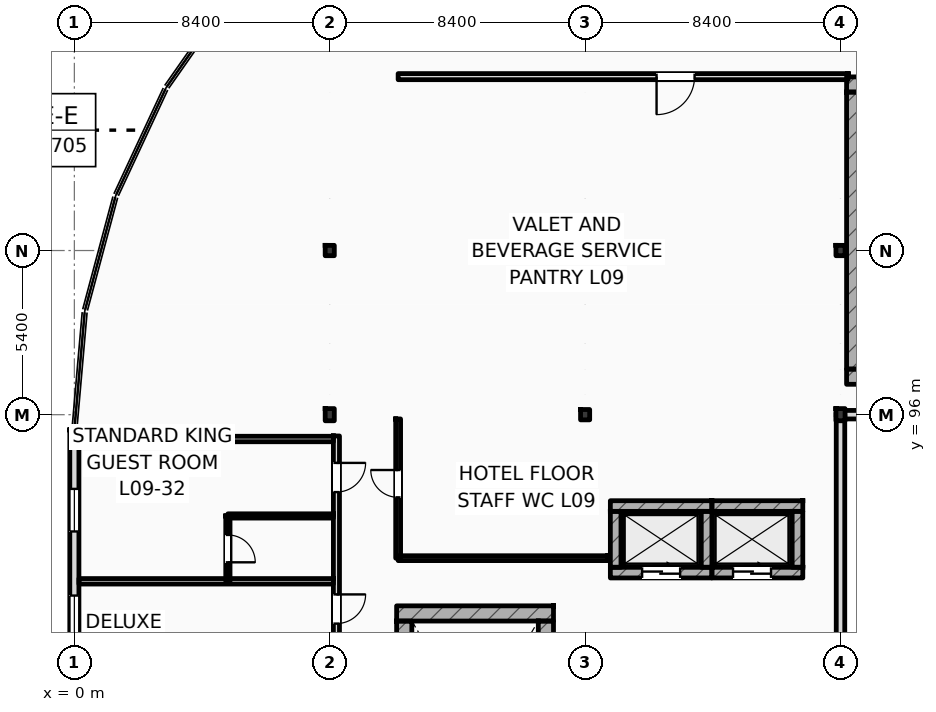
"""IFC4 building model, lengths in metres.
Left out: names, types, materials, properties, quantities, classifications, styles, units other than length and angle.
Written with IfcOpenShell. Run it as: python <this file> out.ifc"""

import sys

from ifc_helpers import new_model, si_unit, direction, frame, frame_2d, origin, origin_2d, place, context, subcontext, project, spatial, rectangle, i_section, extrude, element, fill, save


model = new_model("IFC4")
c1 = context("Model", 3, precision=1e-05, world=origin(), true_north=direction((0.0, 1.0)))
c2 = subcontext(c1, "Body", "Model", "MODEL_VIEW")
j1 = project(units=[si_unit("LENGTHUNIT", "METRE"), si_unit("PLANEANGLEUNIT", "RADIAN")], contexts=[c1])
p1 = place(None, origin())
s1 = spatial("IfcSite", under=j1, at=p1, CompositionType="ELEMENT")
p2 = place(p1, origin())
s2 = spatial("IfcBuilding", under=s1, at=p2, CompositionType="ELEMENT")
p3 = place(p2, frame((0.0, 0.0, 39.0)))
s3 = spatial("IfcBuildingStorey", under=s2, at=p3, CompositionType="ELEMENT", Elevation=39.0)
p4 = place(p3, frame((8.4, 96.0, 0.0), z_axis=(0.0, 0.0, 1.0), x_axis=(1.0, 0.0, 0.0)))
e1 = element("IfcColumn", 1, at=p4, inside=s3, PredefinedType="COLUMN", context=c2, shape_type="SweptSolid", body=[
    extrude(i_section(OverallWidth=0.3, OverallDepth=0.4, WebThickness=0.013, FlangeThickness=0.024, FilletRadius=0.027, at=origin_2d()), origin(), (0.0, 0.0, 1.0), 3.6),
])
p5 = place(p3, frame((16.8, 96.0, 0.0), z_axis=(0.0, 0.0, 1.0), x_axis=(1.0, 0.0, 0.0)))
e2 = element("IfcColumn", 2, at=p5, inside=s3, PredefinedType="COLUMN", context=c2, shape_type="SweptSolid", body=[
    extrude(i_section(OverallWidth=0.3, OverallDepth=0.34, WebThickness=0.012, FlangeThickness=0.021, FilletRadius=0.027, at=origin_2d()), origin(), (0.0, 0.0, 1.0), 3.6),
])
p6 = place(p3, frame((25.2, 96.0, 0.0), z_axis=(0.0, 0.0, 1.0), x_axis=(1.0, 0.0, 0.0)))
e3 = element("IfcColumn", 3, at=p6, inside=s3, PredefinedType="COLUMN", context=c2, shape_type="SweptSolid", body=[
    extrude(i_section(OverallWidth=0.3, OverallDepth=0.4, WebThickness=0.013, FlangeThickness=0.024, FilletRadius=0.027, at=origin_2d()), origin(), (0.0, 0.0, 1.0), 3.6),
])
for number, where, z_axis, x_axis in (
    (4, (8.4, 101.4, 0.0), (0.0, 0.0, 1.0), (1.0, 0.0, 0.0)),
    (5, (16.8, 101.4, 0.0), (0.0, 0.0, 1.0), (1.0, 0.0, 0.0)),
    (6, (25.2, 101.4, 0.0), (0.0, 0.0, 1.0), (1.0, 0.0, 0.0)),
):
    element("IfcColumn", number, at=place(p3, frame(where, z_axis=z_axis, x_axis=x_axis)), inside=s3, PredefinedType="COLUMN", context=c2, shape_type="SweptSolid", body=[
        extrude(i_section(OverallWidth=0.3, OverallDepth=0.34, WebThickness=0.012, FlangeThickness=0.021, FilletRadius=0.027, at=origin_2d()), origin(), (0.0, 0.0, 1.0), 3.6),
    ])
p7 = place(p3, frame((10.6, 89.462, 0.0), z_axis=(0.0, 0.0, 1.0), x_axis=(1.0, 0.0, 0.0)))
e7 = element("IfcWall", 7, at=p7, inside=s3, PredefinedType="SHEAR", context=c2, shape_type="SweptSolid", body=[
    extrude(rectangle(XDim=5.16, YDim=0.5, at=frame_2d((2.58, 0.0))), origin(), (0.0, 0.0, 1.0), 3.6),
])
p8 = place(p3, frame((10.85, 80.1, 0.0), z_axis=(0.0, 0.0, 1.0), x_axis=(0.0, 1.0, 0.0)))
e8 = element("IfcWall", 8, at=p8, inside=s3, PredefinedType="SHEAR", context=c2, shape_type="SweptSolid", body=[
    extrude(rectangle(XDim=9.112, YDim=0.5, at=frame_2d((4.556, 0.0))), origin(), (0.0, 0.0, 1.0), 3.6),
])
p9 = place(p3, frame((15.51, 80.1, 0.0), z_axis=(0.0, 0.0, 1.0), x_axis=(0.0, 1.0, 0.0)))
e9 = element("IfcWall", 9, at=p9, inside=s3, PredefinedType="SHEAR", context=c2, shape_type="SweptSolid", body=[
    extrude(rectangle(XDim=9.112, YDim=0.5, at=frame_2d((4.556, 0.0))), origin(), (0.0, 0.0, 1.0), 3.6),
])
p10 = place(p9, frame((0.44, 0.0, 0.0)))
e10 = element("IfcOpeningElement", 10, at=p10, cuts=e9, PredefinedType="OPENING", context=c2, shape_type="SweptSolid", body=[
    extrude(rectangle(XDim=1.1, YDim=2.2, at=frame_2d((0.55, 1.1))), frame((0.0, 0.26, 0.0), z_axis=(0.0, -1.0, 0.0), x_axis=(1.0, 0.0, 0.0)), (0.0, 0.0, 1.0), 0.52),
])
for number, where, z_axis, x_axis in (
    (11, (25.4, 106.862, 0.0), (0.0, 0.0, 1.0), (1.0, 0.0, 0.0)),
    (12, (25.4, 97.25, 0.0), (0.0, 0.0, 1.0), (1.0, 0.0, 0.0)),
):
    element("IfcWall", number, at=place(p3, frame(where, z_axis=z_axis, x_axis=x_axis)), inside=s3, PredefinedType="SHEAR", context=c2, shape_type="SweptSolid", body=[
        extrude(rectangle(XDim=5.16, YDim=0.5, at=frame_2d((2.58, 0.0))), origin(), (0.0, 0.0, 1.0), 3.6),
    ])
p11 = place(p3, frame((25.65, 97.5, 0.0), z_axis=(0.0, 0.0, 1.0), x_axis=(0.0, 1.0, 0.0)))
e13 = element("IfcWall", 13, at=p11, inside=s3, PredefinedType="SHEAR", context=c2, shape_type="SweptSolid", body=[
    extrude(rectangle(XDim=9.112, YDim=0.5, at=frame_2d((4.556, 0.0))), origin(), (0.0, 0.0, 1.0), 3.6),
])
p12 = place(p3, frame((0.0, 88.0, 0.0), z_axis=(0.0, 0.0, 1.0), x_axis=(0.0, 1.0, 0.0)))
e14 = element("IfcWall", 14, at=p12, inside=s3, PredefinedType="STANDARD", context=c2, shape_type="SweptSolid", body=[
    extrude(rectangle(XDim=7.5, YDim=0.3, at=frame_2d((3.75, 0.0))), origin(), (0.0, 0.0, 1.0), 3.38),
])
p13 = place(p12, frame((0.8, 0.0, 0.9)))
e15 = element("IfcOpeningElement", 15, at=p13, cuts=e14, PredefinedType="OPENING", context=c2, shape_type="SweptSolid", body=[
    extrude(rectangle(XDim=1.25, YDim=1.6, at=frame_2d((0.625, 0.8))), frame((0.0, 0.16, 0.0), z_axis=(0.0, -1.0, 0.0), x_axis=(1.0, 0.0, 0.0)), (0.0, 0.0, 1.0), 0.32),
])
p14 = place(p12, frame((4.159, 0.0, 0.9)))
e16 = element("IfcOpeningElement", 16, at=p14, cuts=e14, PredefinedType="OPENING", context=c2, shape_type="SweptSolid", body=[
    extrude(rectangle(XDim=1.4, YDim=1.7, at=frame_2d((0.7, 0.85))), frame((0.0, 0.16, 0.0), z_axis=(0.0, -1.0, 0.0), x_axis=(1.0, 0.0, 0.0)), (0.0, 0.0, 1.0), 0.32),
])
p15 = place(p3, frame((25.2, 96.0, 0.0), z_axis=(0.0, 0.0, 1.0), x_axis=(1.0, 0.0, 0.0)))
e17 = element("IfcWall", 17, at=p15, inside=s3, PredefinedType="STANDARD", context=c2, shape_type="SweptSolid", body=[
    extrude(rectangle(XDim=70.2, YDim=0.28, at=frame_2d((35.1, 0.0))), origin(), (0.0, 0.0, 1.0), 2.92),
])
p16 = place(p15, frame((16.695, 0.0, 0.9)))
e18 = element("IfcOpeningElement", 18, at=p16, cuts=e17, PredefinedType="OPENING", context=c2, shape_type="SweptSolid", body=[
    extrude(rectangle(XDim=2.25, YDim=1.84, at=frame_2d((1.125, 0.92))), frame((0.0, 0.15, 0.0), z_axis=(0.0, -1.0, 0.0), x_axis=(1.0, 0.0, 0.0)), (0.0, 0.0, 1.0), 0.3),
])
p17 = place(p15, frame((20.748, 0.0, 0.9)))
e19 = element("IfcOpeningElement", 19, at=p17, cuts=e17, PredefinedType="OPENING", context=c2, shape_type="SweptSolid", body=[
    extrude(rectangle(XDim=1.8, YDim=1.84, at=frame_2d((0.9, 0.92))), frame((0.0, 0.15, 0.0), z_axis=(0.0, -1.0, 0.0), x_axis=(1.0, 0.0, 0.0)), (0.0, 0.0, 1.0), 0.3),
])
p18 = place(p15, frame((25.963, 0.0, 0.9)))
e20 = element("IfcOpeningElement", 20, at=p18, cuts=e17, PredefinedType="OPENING", context=c2, shape_type="SweptSolid", body=[
    extrude(rectangle(XDim=2.55, YDim=1.84, at=frame_2d((1.275, 0.92))), frame((0.0, 0.15, 0.0), z_axis=(0.0, -1.0, 0.0), x_axis=(1.0, 0.0, 0.0)), (0.0, 0.0, 1.0), 0.3),
])
p19 = place(p15, frame((32.177, 0.0, 0.9)))
e21 = element("IfcOpeningElement", 21, at=p19, cuts=e17, PredefinedType="OPENING", context=c2, shape_type="SweptSolid", body=[
    extrude(rectangle(XDim=1.35, YDim=1.84, at=frame_2d((0.675, 0.92))), frame((0.0, 0.15, 0.0), z_axis=(0.0, -1.0, 0.0), x_axis=(1.0, 0.0, 0.0)), (0.0, 0.0, 1.0), 0.3),
])
p20 = place(p15, frame((35.267, 0.0, 0.9)))
e22 = element("IfcOpeningElement", 22, at=p20, cuts=e17, PredefinedType="OPENING", context=c2, shape_type="SweptSolid", body=[
    extrude(rectangle(XDim=2.85, YDim=1.84, at=frame_2d((1.425, 0.92))), frame((0.0, 0.15, 0.0), z_axis=(0.0, -1.0, 0.0), x_axis=(1.0, 0.0, 0.0)), (0.0, 0.0, 1.0), 0.3),
])
p21 = place(p15, frame((55.56, 0.0, 0.9)))
e23 = element("IfcOpeningElement", 23, at=p21, cuts=e17, PredefinedType="OPENING", context=c2, shape_type="SweptSolid", body=[
    extrude(rectangle(XDim=1.8, YDim=1.84, at=frame_2d((0.9, 0.92))), frame((0.0, 0.15, 0.0), z_axis=(0.0, -1.0, 0.0), x_axis=(1.0, 0.0, 0.0)), (0.0, 0.0, 1.0), 0.3),
])
p22 = place(p15, frame((59.093, 0.0, 0.9)))
e24 = element("IfcOpeningElement", 24, at=p22, cuts=e17, PredefinedType="OPENING", context=c2, shape_type="SweptSolid", body=[
    extrude(rectangle(XDim=2.412, YDim=1.84, at=frame_2d((1.206, 0.92))), frame((0.0, 0.15, 0.0), z_axis=(0.0, -1.0, 0.0), x_axis=(1.0, 0.0, 0.0)), (0.0, 0.0, 1.0), 0.3),
])
p23 = place(p15, frame((63.325, 0.0, 0.9)))
e25 = element("IfcOpeningElement", 25, at=p23, cuts=e17, PredefinedType="OPENING", context=c2, shape_type="SweptSolid", body=[
    extrude(rectangle(XDim=1.8, YDim=1.84, at=frame_2d((0.9, 0.92))), frame((0.0, 0.15, 0.0), z_axis=(0.0, -1.0, 0.0), x_axis=(1.0, 0.0, 0.0)), (0.0, 0.0, 1.0), 0.3),
])
p24 = place(p15, frame((66.718, 0.0, 0.9)))
e26 = element("IfcOpeningElement", 26, at=p24, cuts=e17, PredefinedType="OPENING", context=c2, shape_type="SweptSolid", body=[
    extrude(rectangle(XDim=2.472, YDim=1.84, at=frame_2d((1.236, 0.92))), frame((0.0, 0.15, 0.0), z_axis=(0.0, -1.0, 0.0), x_axis=(1.0, 0.0, 0.0)), (0.0, 0.0, 1.0), 0.3),
])
p25 = place(p3, frame((25.2, 79.5, 0.0), z_axis=(0.0, 0.0, 1.0), x_axis=(0.0, 1.0, 0.0)))
e27 = element("IfcWall", 27, at=p25, inside=s3, PredefinedType="STANDARD", context=c2, shape_type="SweptSolid", body=[
    extrude(rectangle(XDim=16.5, YDim=0.28, at=frame_2d((8.25, 0.0))), origin(), (0.0, 0.0, 1.0), 3.01),
])
p26 = place(p3, frame((17.63, 92.995, 0.0), z_axis=(0.0, 0.0, 1.0), x_axis=(1.0, 0.0, 0.0)))
e28 = element("IfcWall", 28, at=p26, inside=s3, PredefinedType="SHEAR", context=c2, shape_type="SweptSolid", body=[
    extrude(rectangle(XDim=3.34, YDim=0.35, at=frame_2d((1.67, 0.0))), origin(), (0.0, 0.0, 1.0), 3.38),
])
p27 = place(p3, frame((17.63, 90.805, 0.0), z_axis=(0.0, 0.0, 1.0), x_axis=(1.0, 0.0, 0.0)))
e29 = element("IfcWall", 29, at=p27, inside=s3, PredefinedType="SHEAR", context=c2, shape_type="SweptSolid", body=[
    extrude(rectangle(XDim=3.34, YDim=0.35, at=frame_2d((1.67, 0.0))), origin(), (0.0, 0.0, 1.0), 3.38),
])
p28 = place(p27, frame((1.045, 0.0, 0.0)))
e30 = element("IfcOpeningElement", 30, at=p28, cuts=e29, PredefinedType="OPENING", context=c2, shape_type="SweptSolid", body=[
    extrude(rectangle(XDim=1.25, YDim=2.25, at=frame_2d((0.625, 1.125))), frame((0.0, 0.185, 0.0), z_axis=(0.0, -1.0, 0.0), x_axis=(1.0, 0.0, 0.0)), (0.0, 0.0, 1.0), 0.37),
])
for number, where, z_axis, x_axis in (
    (31, (17.805, 90.98, 0.0), (0.0, 0.0, 1.0), (0.0, 1.0, 0.0)),
    (32, (20.795, 90.98, 0.0), (0.0, 0.0, 1.0), (0.0, 1.0, 0.0)),
):
    element("IfcWall", number, at=place(p3, frame(where, z_axis=z_axis, x_axis=x_axis)), inside=s3, PredefinedType="SHEAR", context=c2, shape_type="SweptSolid", body=[
        extrude(rectangle(XDim=1.84, YDim=0.35, at=frame_2d((0.92, 0.0))), origin(), (0.0, 0.0, 1.0), 3.38),
    ])
p29 = place(p3, frame((20.97, 92.995, 0.0), z_axis=(0.0, 0.0, 1.0), x_axis=(1.0, 0.0, 0.0)))
e33 = element("IfcWall", 33, at=p29, inside=s3, PredefinedType="SHEAR", context=c2, shape_type="SweptSolid", body=[
    extrude(rectangle(XDim=2.99, YDim=0.35, at=frame_2d((1.495, 0.0))), origin(), (0.0, 0.0, 1.0), 3.38),
])
p30 = place(p3, frame((20.97, 90.805, 0.0), z_axis=(0.0, 0.0, 1.0), x_axis=(1.0, 0.0, 0.0)))
e34 = element("IfcWall", 34, at=p30, inside=s3, PredefinedType="SHEAR", context=c2, shape_type="SweptSolid", body=[
    extrude(rectangle(XDim=2.99, YDim=0.35, at=frame_2d((1.495, 0.0))), origin(), (0.0, 0.0, 1.0), 3.38),
])
p31 = place(p30, frame((0.695, 0.0, 0.0)))
e35 = element("IfcOpeningElement", 35, at=p31, cuts=e34, PredefinedType="OPENING", context=c2, shape_type="SweptSolid", body=[
    extrude(rectangle(XDim=1.25, YDim=2.25, at=frame_2d((0.625, 1.125))), frame((0.0, 0.185, 0.0), z_axis=(0.0, -1.0, 0.0), x_axis=(1.0, 0.0, 0.0)), (0.0, 0.0, 1.0), 0.37),
])
p32 = place(p3, frame((23.785, 90.98, 0.0), z_axis=(0.0, 0.0, 1.0), x_axis=(0.0, 1.0, 0.0)))
e36 = element("IfcWall", 36, at=p32, inside=s3, PredefinedType="SHEAR", context=c2, shape_type="SweptSolid", body=[
    extrude(rectangle(XDim=1.84, YDim=0.35, at=frame_2d((0.92, 0.0))), origin(), (0.0, 0.0, 1.0), 3.38),
])
p33 = place(p3, frame((10.65, 107.12, 0.0), z_axis=(0.0, 0.0, 1.0), x_axis=(1.0, 0.0, 0.0)))
e37 = element("IfcWall", 37, at=p33, inside=s3, PredefinedType="PARTITIONING", context=c2, shape_type="SweptSolid", body=[
    extrude(rectangle(XDim=14.8, YDim=0.2, at=frame_2d((7.4, 0.0))), origin(), (0.0, 0.0, 1.0), 3.38),
])
p34 = place(p33, frame((8.5, 0.0, 0.0)))
e38 = element("IfcOpeningElement", 38, at=p34, cuts=e37, PredefinedType="OPENING", context=c2, shape_type="SweptSolid", body=[
    extrude(rectangle(XDim=1.25, YDim=2.15, at=frame_2d((0.625, 1.075))), frame((0.0, 0.11, 0.0), z_axis=(0.0, -1.0, 0.0), x_axis=(1.0, 0.0, 0.0)), (0.0, 0.0, 1.0), 0.22),
])
p35 = place(p3, frame((8.62, 62.64, 0.0), z_axis=(0.0, 0.0, 1.0), x_axis=(0.0, 1.0, 0.0)))
e39 = element("IfcWall", 39, at=p35, inside=s3, PredefinedType="PARTITIONING", context=c2, shape_type="SweptSolid", body=[
    extrude(rectangle(XDim=32.66, YDim=0.2, at=frame_2d((16.33, 0.0))), origin(), (0.0, 0.0, 1.0), 2.91),
])
p36 = place(p35, frame((3.122, 0.0, 0.0)))
e40 = element("IfcOpeningElement", 40, at=p36, cuts=e39, PredefinedType="OPENING", context=c2, shape_type="SweptSolid", body=[
    extrude(rectangle(XDim=0.96, YDim=2.2, at=frame_2d((0.48, 1.1))), frame((0.0, 0.11, 0.0), z_axis=(0.0, -1.0, 0.0), x_axis=(1.0, 0.0, 0.0)), (0.0, 0.0, 1.0), 0.22),
])
p37 = place(p35, frame((5.575, 0.0, 0.0)))
e41 = element("IfcOpeningElement", 41, at=p37, cuts=e39, PredefinedType="OPENING", context=c2, shape_type="SweptSolid", body=[
    extrude(rectangle(XDim=0.96, YDim=2.2, at=frame_2d((0.48, 1.1))), frame((0.0, 0.11, 0.0), z_axis=(0.0, -1.0, 0.0), x_axis=(1.0, 0.0, 0.0)), (0.0, 0.0, 1.0), 0.22),
])
p38 = place(p35, frame((12.353, 0.0, 0.0)))
e42 = element("IfcOpeningElement", 42, at=p38, cuts=e39, PredefinedType="OPENING", context=c2, shape_type="SweptSolid", body=[
    extrude(rectangle(XDim=0.96, YDim=2.2, at=frame_2d((0.48, 1.1))), frame((0.0, 0.11, 0.0), z_axis=(0.0, -1.0, 0.0), x_axis=(1.0, 0.0, 0.0)), (0.0, 0.0, 1.0), 0.22),
])
p39 = place(p35, frame((14.581, 0.0, 0.0)))
e43 = element("IfcOpeningElement", 43, at=p39, cuts=e39, PredefinedType="OPENING", context=c2, shape_type="SweptSolid", body=[
    extrude(rectangle(XDim=0.96, YDim=2.2, at=frame_2d((0.48, 1.1))), frame((0.0, 0.11, 0.0), z_axis=(0.0, -1.0, 0.0), x_axis=(1.0, 0.0, 0.0)), (0.0, 0.0, 1.0), 0.22),
])
p40 = place(p35, frame((21.61, 0.0, 0.0)))
e44 = element("IfcOpeningElement", 44, at=p40, cuts=e39, PredefinedType="OPENING", context=c2, shape_type="SweptSolid", body=[
    extrude(rectangle(XDim=0.96, YDim=2.2, at=frame_2d((0.48, 1.1))), frame((0.0, 0.11, 0.0), z_axis=(0.0, -1.0, 0.0), x_axis=(1.0, 0.0, 0.0)), (0.0, 0.0, 1.0), 0.22),
])
p41 = place(p35, frame((26.488, 0.0, 0.0)))
e45 = element("IfcOpeningElement", 45, at=p41, cuts=e39, PredefinedType="OPENING", context=c2, shape_type="SweptSolid", body=[
    extrude(rectangle(XDim=0.96, YDim=2.2, at=frame_2d((0.48, 1.1))), frame((0.0, 0.11, 0.0), z_axis=(0.0, -1.0, 0.0), x_axis=(1.0, 0.0, 0.0)), (0.0, 0.0, 1.0), 0.22),
])
p42 = place(p35, frame((30.814, 0.0, 0.0)))
e46 = element("IfcOpeningElement", 46, at=p42, cuts=e39, PredefinedType="OPENING", context=c2, shape_type="SweptSolid", body=[
    extrude(rectangle(XDim=0.96, YDim=2.2, at=frame_2d((0.48, 1.1))), frame((0.0, 0.11, 0.0), z_axis=(0.0, -1.0, 0.0), x_axis=(1.0, 0.0, 0.0)), (0.0, 0.0, 1.0), 0.22),
])
p43 = place(p3, frame((10.65, 91.28, 0.0), z_axis=(0.0, 0.0, 1.0), x_axis=(0.0, 1.0, 0.0)))
e47 = element("IfcWall", 47, at=p43, inside=s3, PredefinedType="PARTITIONING", context=c2, shape_type="SweptSolid", body=[
    extrude(rectangle(XDim=4.58, YDim=0.16, at=frame_2d((2.29, 0.0))), origin(), (0.0, 0.0, 1.0), 3.38),
])
p44 = place(p43, frame((2.0, 0.0, 0.0)))
e48 = element("IfcOpeningElement", 48, at=p44, cuts=e47, PredefinedType="OPENING", context=c2, shape_type="SweptSolid", body=[
    extrude(rectangle(XDim=0.9, YDim=2.1, at=frame_2d((0.45, 1.05))), frame((0.0, 0.09, 0.0), z_axis=(0.0, -1.0, 0.0), x_axis=(1.0, 0.0, 0.0)), (0.0, 0.0, 1.0), 0.18),
])
p45 = place(p3, frame((10.65, 91.28, 0.0), z_axis=(0.0, 0.0, 1.0), x_axis=(1.0, 0.0, 0.0)))
e49 = element("IfcWall", 49, at=p45, inside=s3, PredefinedType="PARTITIONING", context=c2, shape_type="SweptSolid", body=[
    extrude(rectangle(XDim=6.9, YDim=0.16, at=frame_2d((3.45, 0.0))), origin(), (0.0, 0.0, 1.0), 3.38),
])
for number, where, z_axis, x_axis in (
    (50, (0.15, 90.519, 0.0), (0.0, 0.0, 1.0), (1.0, 0.0, 0.0)),
    (51, (0.15, 95.2, 0.0), (0.0, 0.0, 1.0), (1.0, 0.0, 0.0)),
):
    element("IfcWall", number, at=place(p3, frame(where, z_axis=z_axis, x_axis=x_axis)), inside=s3, PredefinedType="PARTITIONING", context=c2, shape_type="SweptSolid", body=[
        extrude(rectangle(XDim=8.37, YDim=0.18, at=frame_2d((4.185, 0.0))), origin(), (0.0, 0.0, 1.0), 3.38),
    ])
p46 = place(p3, frame((5.05, 92.669, 0.0), z_axis=(0.0, 0.0, 1.0), x_axis=(1.0, 0.0, 0.0)))
e52 = element("IfcWall", 52, at=p46, inside=s3, PredefinedType="PARTITIONING", context=c2, shape_type="SweptSolid", body=[
    extrude(rectangle(XDim=3.47, YDim=0.14, at=frame_2d((1.735, 0.0))), origin(), (0.0, 0.0, 1.0), 3.38),
])
p47 = place(p3, frame((5.05, 90.519, 0.0), z_axis=(0.0, 0.0, 1.0), x_axis=(0.0, 1.0, 0.0)))
e53 = element("IfcWall", 53, at=p47, inside=s3, PredefinedType="PARTITIONING", context=c2, shape_type="SweptSolid", body=[
    extrude(rectangle(XDim=2.15, YDim=0.14, at=frame_2d((1.075, 0.0))), origin(), (0.0, 0.0, 1.0), 3.38),
])
p48 = place(p47, frame((0.625, 0.0, 0.0)))
e54 = element("IfcOpeningElement", 54, at=p48, cuts=e53, PredefinedType="OPENING", context=c2, shape_type="SweptSolid", body=[
    extrude(rectangle(XDim=0.9, YDim=2.1, at=frame_2d((0.45, 1.05))), frame((0.0, 0.08, 0.0), z_axis=(0.0, -1.0, 0.0), x_axis=(1.0, 0.0, 0.0)), (0.0, 0.0, 1.0), 0.16),
])
p49 = place(p13, origin())
e55 = element("IfcWindow", 55, at=p49, inside=s3, PartitioningType="DOUBLE_PANEL_VERTICAL", PredefinedType="WINDOW", context=c2, shape_type="SweptSolid", body=[
    extrude(rectangle(XDim=1.25, YDim=1.6, at=frame_2d((0.625, 0.8))), frame((0.0, 0.03, 0.0), z_axis=(0.0, -1.0, 0.0), x_axis=(1.0, 0.0, 0.0)), (0.0, 0.0, 1.0), 0.06),
])
fill(e15, e55)
p50 = place(p14, origin())
e56 = element("IfcWindow", 56, at=p50, inside=s3, PartitioningType="DOUBLE_PANEL_VERTICAL", PredefinedType="WINDOW", context=c2, shape_type="SweptSolid", body=[
    extrude(rectangle(XDim=1.4, YDim=1.7, at=frame_2d((0.7, 0.85))), frame((0.0, 0.03, 0.0), z_axis=(0.0, -1.0, 0.0), x_axis=(1.0, 0.0, 0.0)), (0.0, 0.0, 1.0), 0.06),
])
fill(e16, e56)
p51 = place(p28, origin())
e57 = element("IfcDoor", 57, at=p51, inside=s3, OperationType="SLIDING_TO_LEFT", PredefinedType="DOOR", context=c2, shape_type="SweptSolid", body=[
    extrude(rectangle(XDim=1.25, YDim=2.25, at=frame_2d((0.625, 1.125))), frame((0.0, 0.025, 0.0), z_axis=(0.0, -1.0, 0.0), x_axis=(1.0, 0.0, 0.0)), (0.0, 0.0, 1.0), 0.05),
])
fill(e30, e57)
p52 = place(p31, origin())
e58 = element("IfcDoor", 58, at=p52, inside=s3, OperationType="SLIDING_TO_LEFT", PredefinedType="DOOR", context=c2, shape_type="SweptSolid", body=[
    extrude(rectangle(XDim=1.25, YDim=2.25, at=frame_2d((0.625, 1.125))), frame((0.0, 0.025, 0.0), z_axis=(0.0, -1.0, 0.0), x_axis=(1.0, 0.0, 0.0)), (0.0, 0.0, 1.0), 0.05),
])
fill(e35, e58)
p53 = place(p41, frame((0.96, 0.0, 0.0), z_axis=(0.0, 0.0, 1.0), x_axis=(-1.0, 0.0, 0.0)))
e59 = element("IfcDoor", 59, at=p53, inside=s3, OperationType="SINGLE_SWING_RIGHT", PredefinedType="DOOR", context=c2, shape_type="SweptSolid", body=[
    extrude(rectangle(XDim=0.96, YDim=2.2, at=frame_2d((0.48, 1.1))), frame((0.0, 0.025, 0.0), z_axis=(0.0, -1.0, 0.0), x_axis=(1.0, 0.0, 0.0)), (0.0, 0.0, 1.0), 0.05),
])
fill(e45, e59)
p54 = place(p42, frame((0.96, 0.0, 0.0), z_axis=(0.0, 0.0, 1.0), x_axis=(-1.0, 0.0, 0.0)))
e60 = element("IfcDoor", 60, at=p54, inside=s3, OperationType="SINGLE_SWING_RIGHT", PredefinedType="DOOR", context=c2, shape_type="SweptSolid", body=[
    extrude(rectangle(XDim=0.96, YDim=2.2, at=frame_2d((0.48, 1.1))), frame((0.0, 0.025, 0.0), z_axis=(0.0, -1.0, 0.0), x_axis=(1.0, 0.0, 0.0)), (0.0, 0.0, 1.0), 0.05),
])
fill(e46, e60)
p55 = place(p48, frame((0.9, 0.0, 0.0), z_axis=(0.0, 0.0, 1.0), x_axis=(-1.0, 0.0, 0.0)))
e61 = element("IfcDoor", 61, at=p55, inside=s3, OperationType="SINGLE_SWING_LEFT", PredefinedType="DOOR", context=c2, shape_type="SweptSolid", body=[
    extrude(rectangle(XDim=0.9, YDim=2.1, at=frame_2d((0.45, 1.05))), frame((0.0, 0.025, 0.0), z_axis=(0.0, -1.0, 0.0), x_axis=(1.0, 0.0, 0.0)), (0.0, 0.0, 1.0), 0.05),
])
fill(e54, e61)
p56 = place(p44, origin())
e62 = element("IfcDoor", 62, at=p56, inside=s3, OperationType="SINGLE_SWING_RIGHT", PredefinedType="DOOR", context=c2, shape_type="SweptSolid", body=[
    extrude(rectangle(XDim=0.9, YDim=2.1, at=frame_2d((0.45, 1.05))), frame((0.0, 0.025, 0.0), z_axis=(0.0, -1.0, 0.0), x_axis=(1.0, 0.0, 0.0)), (0.0, 0.0, 1.0), 0.05),
])
fill(e48, e62)
p57 = place(p34, frame((1.25, 0.0, 0.0), z_axis=(0.0, 0.0, 1.0), x_axis=(-1.0, 0.0, 0.0)))
e63 = element("IfcDoor", 63, at=p57, inside=s3, OperationType="SINGLE_SWING_LEFT", PredefinedType="DOOR", context=c2, shape_type="SweptSolid", body=[
    extrude(rectangle(XDim=1.25, YDim=2.15, at=frame_2d((0.625, 1.075))), frame((0.0, 0.025, 0.0), z_axis=(0.0, -1.0, 0.0), x_axis=(1.0, 0.0, 0.0)), (0.0, 0.0, 1.0), 0.05),
])
fill(e38, e63)
save(model, sys.argv[1])
